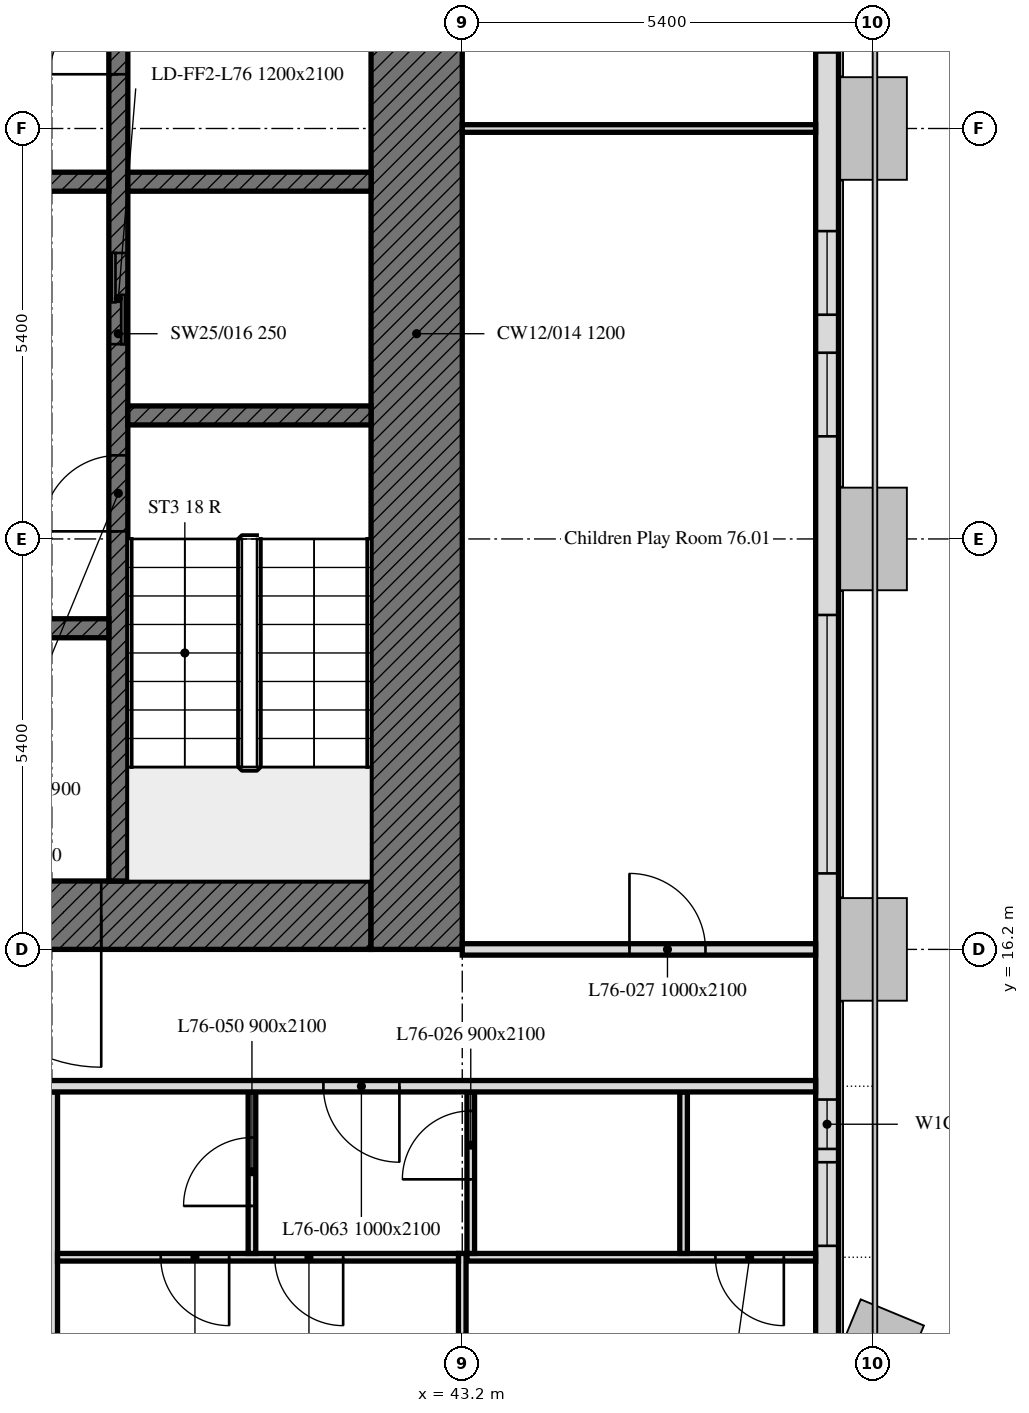
"""IFC4 building model, lengths in metres.
Left out: names, types, materials, properties, quantities, classifications, styles, units other than length and angle.
Written with IfcOpenShell. Run it as: python <this file> out.ifc"""

import sys

from ifc_helpers import new_model, si_unit, direction, frame, frame_2d, origin, place, context, subcontext, project, spatial, rectangle, extrude, element, fill, save


model = new_model("IFC4")
c1 = context("Model", 3, precision=1e-05, world=origin(), true_north=direction((0.0, 1.0)))
c2 = subcontext(c1, "Body", "Model", "MODEL_VIEW")
j1 = project(units=[si_unit("LENGTHUNIT", "METRE"), si_unit("PLANEANGLEUNIT", "RADIAN")], contexts=[c1])
p1 = place(None, origin())
s1 = spatial("IfcSite", under=j1, at=p1, CompositionType="ELEMENT")
p2 = place(p1, origin())
s2 = spatial("IfcBuilding", under=s1, at=p2, CompositionType="ELEMENT")
p3 = place(p2, frame((0.0, 0.0, 304.9)))
s3 = spatial("IfcBuildingStorey", under=s2, at=p3, CompositionType="ELEMENT", Elevation=304.9)
p4 = place(p3, frame((48.0, 10.986, 0.0), z_axis=(0.0, 0.0, 1.0), x_axis=(0.0, 1.0, 0.0)))
e1 = element("IfcWall", 1, at=p4, inside=s3, PredefinedType="SOLIDWALL", context=c2, shape_type="SweptSolid", body=[
    extrude(rectangle(XDim=32.027, YDim=0.3, at=frame_2d((16.014, 0.0))), origin(), (0.0, 0.0, 1.0), 2.8),
])
p5 = place(p4, frame((1.314, 0.0, 0.9)))
e2 = element("IfcOpeningElement", 2, at=p5, cuts=e1, PredefinedType="OPENING", context=c2, shape_type="SweptSolid", body=[
    extrude(rectangle(XDim=1.1, YDim=1.7, at=frame_2d((0.55, 0.85))), frame((0.0, 0.16, 0.0), z_axis=(0.0, -1.0, 0.0), x_axis=(1.0, 0.0, 0.0)), (0.0, 0.0, 1.0), 0.32),
])
p6 = place(p4, frame((2.589, 0.0, 0.9)))
e3 = element("IfcOpeningElement", 3, at=p6, cuts=e1, PredefinedType="OPENING", context=c2, shape_type="SweptSolid", body=[
    extrude(rectangle(XDim=0.65, YDim=1.7, at=frame_2d((0.325, 0.85))), frame((0.0, 0.16, 0.0), z_axis=(0.0, -1.0, 0.0), x_axis=(1.0, 0.0, 0.0)), (0.0, 0.0, 1.0), 0.32),
])
p7 = place(p4, frame((6.214, 0.0, 0.9)))
e4 = element("IfcOpeningElement", 4, at=p7, cuts=e1, PredefinedType="OPENING", context=c2, shape_type="SweptSolid", body=[
    extrude(rectangle(XDim=3.4, YDim=1.7, at=frame_2d((1.7, 0.85))), frame((0.0, 0.16, 0.0), z_axis=(0.0, -1.0, 0.0), x_axis=(1.0, 0.0, 0.0)), (0.0, 0.0, 1.0), 0.32),
])
p8 = place(p4, frame((11.964, 0.0, 0.9)))
e5 = element("IfcOpeningElement", 5, at=p8, cuts=e1, PredefinedType="OPENING", context=c2, shape_type="SweptSolid", body=[
    extrude(rectangle(XDim=1.1, YDim=1.7, at=frame_2d((0.55, 0.85))), frame((0.0, 0.16, 0.0), z_axis=(0.0, -1.0, 0.0), x_axis=(1.0, 0.0, 0.0)), (0.0, 0.0, 1.0), 0.32),
])
p9 = place(p4, frame((13.564, 0.0, 0.9)))
e6 = element("IfcOpeningElement", 6, at=p9, cuts=e1, PredefinedType="OPENING", context=c2, shape_type="SweptSolid", body=[
    extrude(rectangle(XDim=1.1, YDim=1.7, at=frame_2d((0.55, 0.85))), frame((0.0, 0.16, 0.0), z_axis=(0.0, -1.0, 0.0), x_axis=(1.0, 0.0, 0.0)), (0.0, 0.0, 1.0), 0.32),
])
p10 = place(p4, frame((17.014, 0.0, 0.9)))
e7 = element("IfcOpeningElement", 7, at=p10, cuts=e1, PredefinedType="OPENING", context=c2, shape_type="SweptSolid", body=[
    extrude(rectangle(XDim=3.4, YDim=1.7, at=frame_2d((1.7, 0.85))), frame((0.0, 0.16, 0.0), z_axis=(0.0, -1.0, 0.0), x_axis=(1.0, 0.0, 0.0)), (0.0, 0.0, 1.0), 0.32),
])
p11 = place(p4, frame((23.389, 0.0, 0.9)))
e8 = element("IfcOpeningElement", 8, at=p11, cuts=e1, PredefinedType="OPENING", context=c2, shape_type="SweptSolid", body=[
    extrude(rectangle(XDim=0.65, YDim=1.7, at=frame_2d((0.325, 0.85))), frame((0.0, 0.16, 0.0), z_axis=(0.0, -1.0, 0.0), x_axis=(1.0, 0.0, 0.0)), (0.0, 0.0, 1.0), 0.32),
])
p12 = place(p4, frame((24.364, 0.0, 0.9)))
e9 = element("IfcOpeningElement", 9, at=p12, cuts=e1, PredefinedType="OPENING", context=c2, shape_type="SweptSolid", body=[
    extrude(rectangle(XDim=1.1, YDim=1.7, at=frame_2d((0.55, 0.85))), frame((0.0, 0.16, 0.0), z_axis=(0.0, -1.0, 0.0), x_axis=(1.0, 0.0, 0.0)), (0.0, 0.0, 1.0), 0.32),
])
p13 = place(p4, frame((28.164, 0.0, 0.9)))
e10 = element("IfcOpeningElement", 10, at=p13, cuts=e1, PredefinedType="OPENING", context=c2, shape_type="SweptSolid", body=[
    extrude(rectangle(XDim=1.1, YDim=1.7, at=frame_2d((0.55, 0.85))), frame((0.0, 0.16, 0.0), z_axis=(0.0, -1.0, 0.0), x_axis=(1.0, 0.0, 0.0)), (0.0, 0.0, 1.0), 0.32),
])
p14 = place(p4, frame((29.764, 0.0, 0.9)))
e11 = element("IfcOpeningElement", 11, at=p14, cuts=e1, PredefinedType="OPENING", context=c2, shape_type="SweptSolid", body=[
    extrude(rectangle(XDim=1.1, YDim=1.7, at=frame_2d((0.55, 0.85))), frame((0.0, 0.16, 0.0), z_axis=(0.0, -1.0, 0.0), x_axis=(1.0, 0.0, 0.0)), (0.0, 0.0, 1.0), 0.32),
])
p15 = place(p3, frame((42.0, 16.65, 0.0), z_axis=(0.0, 0.0, 1.0), x_axis=(-1.0, 0.0, 0.0)))
e12 = element("IfcWall", 12, at=p15, inside=s3, PredefinedType="SOLIDWALL", context=c2, shape_type="SweptSolid", body=[
    extrude(rectangle(XDim=11.1, YDim=0.9, at=frame_2d((5.55, 0.0))), origin(), (0.0, 0.0, 1.0), 2.8),
])
p16 = place(p15, frame((3.55, 0.0, 0.0)))
e13 = element("IfcOpeningElement", 13, at=p16, cuts=e12, PredefinedType="OPENING", context=c2, shape_type="SweptSolid", body=[
    extrude(rectangle(XDim=2.0, YDim=2.4, at=frame_2d((1.0, 1.2))), frame((0.0, 0.45, 0.0), z_axis=(0.0, -1.0, 0.0), x_axis=(1.0, 0.0, 0.0)), (0.0, 0.0, 1.0), 0.9),
])
p17 = place(p3, frame((42.6, 32.4, 0.0), z_axis=(0.0, 0.0, 1.0), x_axis=(0.0, -1.0, 0.0)))
e14 = element("IfcWall", 14, at=p17, inside=s3, PredefinedType="SOLIDWALL", context=c2, shape_type="SweptSolid", body=[
    extrude(rectangle(XDim=16.2, YDim=1.2, at=frame_2d((8.1, 0.0))), origin(), (0.0, 0.0, 1.0), 2.8),
])
p18 = place(p3, frame((38.675, 17.1, 0.0), z_axis=(0.0, 0.0, 1.0), x_axis=(0.0, 1.0, 0.0)))
e15 = element("IfcWall", 15, at=p18, inside=s3, PredefinedType="SOLIDWALL", context=c2, shape_type="SweptSolid", body=[
    extrude(rectangle(XDim=14.4, YDim=0.25, at=frame_2d((7.2, 0.0))), origin(), (0.0, 0.0, 1.0), 2.8),
])
p19 = place(p18, frame((4.6, 0.0, 0.0)))
e16 = element("IfcOpeningElement", 16, at=p19, cuts=e15, PredefinedType="OPENING", context=c2, shape_type="SweptSolid", body=[
    extrude(rectangle(XDim=1.0, YDim=2.1, at=frame_2d((0.5, 1.05))), frame((0.0, 0.125, 0.0), z_axis=(0.0, -1.0, 0.0), x_axis=(1.0, 0.0, 0.0)), (0.0, 0.0, 1.0), 0.25),
])
p20 = place(p18, frame((7.062, 0.0, 0.0)))
e17 = element("IfcOpeningElement", 17, at=p20, cuts=e15, PredefinedType="OPENING", context=c2, shape_type="SweptSolid", body=[
    extrude(rectangle(XDim=1.2, YDim=2.1, at=frame_2d((0.6, 1.05))), frame((0.0, 0.125, 0.0), z_axis=(0.0, -1.0, 0.0), x_axis=(1.0, 0.0, 0.0)), (0.0, 0.0, 1.0), 0.25),
])
p21 = place(p18, frame((10.614, 0.0, 0.0)))
e18 = element("IfcOpeningElement", 18, at=p21, cuts=e15, PredefinedType="OPENING", context=c2, shape_type="SweptSolid", body=[
    extrude(rectangle(XDim=0.9, YDim=2.1, at=frame_2d((0.45, 1.05))), frame((0.0, 0.125, 0.0), z_axis=(0.0, -1.0, 0.0), x_axis=(1.0, 0.0, 0.0)), (0.0, 0.0, 1.0), 0.25),
])
p22 = place(p18, frame((13.226, 0.0, 0.0)))
e19 = element("IfcOpeningElement", 19, at=p22, cuts=e15, PredefinedType="OPENING", context=c2, shape_type="SweptSolid", body=[
    extrude(rectangle(XDim=0.9, YDim=2.1, at=frame_2d((0.45, 1.05))), frame((0.0, 0.125, 0.0), z_axis=(0.0, -1.0, 0.0), x_axis=(1.0, 0.0, 0.0)), (0.0, 0.0, 1.0), 0.25),
])
for number, where, z_axis, x_axis in (
    (20, (38.8, 23.225, 0.0), (0.0, 0.0, 1.0), (1.0, 0.0, 0.0)),
    (21, (38.8, 26.3, 0.0), (0.0, 0.0, 1.0), (1.0, 0.0, 0.0)),
):
    element("IfcWall", number, at=place(p3, frame(where, z_axis=z_axis, x_axis=x_axis)), inside=s3, PredefinedType="SOLIDWALL", context=c2, shape_type="SweptSolid", body=[
        extrude(rectangle(XDim=3.2, YDim=0.25, at=frame_2d((1.6, 0.0))), origin(), (0.0, 0.0, 1.0), 2.8),
    ])
for number, where, z_axis, x_axis in (
    (22, (35.8, 26.3, 0.0), (0.0, 0.0, 1.0), (1.0, 0.0, 0.0)),
    (23, (35.8, 20.425, 0.0), (0.0, 0.0, 1.0), (1.0, 0.0, 0.0)),
):
    element("IfcWall", number, at=place(p3, frame(where, z_axis=z_axis, x_axis=x_axis)), inside=s3, PredefinedType="SOLIDWALL", context=c2, shape_type="SweptSolid", body=[
        extrude(rectangle(XDim=2.75, YDim=0.25, at=frame_2d((1.375, 0.0))), origin(), (0.0, 0.0, 1.0), 2.8),
    ])
p23 = place(p3, frame((43.2, 27.0, 0.0), z_axis=(0.0, 0.0, 1.0), x_axis=(1.0, 0.0, 0.0)))
e24 = element("IfcWall", 24, at=p23, inside=s3, PredefinedType="PARTITIONING", context=c2, shape_type="SweptSolid", body=[
    extrude(rectangle(XDim=4.649, YDim=0.1, at=frame_2d((2.325, 0.0))), origin(), (0.0, 0.0, 1.0), 2.2),
])
p24 = place(p3, frame((37.8, 11.12, 0.0), z_axis=(0.0, 0.0, 1.0), x_axis=(0.0, 1.0, 0.0)))
e25 = element("IfcWall", 25, at=p24, inside=s3, PredefinedType="PARTITIONING", context=c2, shape_type="SweptSolid", body=[
    extrude(rectangle(XDim=3.205, YDim=0.15, at=frame_2d((1.603, 0.0))), origin(), (0.0, 0.0, 1.0), 2.8),
])
p25 = place(p3, frame((43.2, 11.12, 0.0), z_axis=(0.0, 0.0, 1.0), x_axis=(0.0, 1.0, 0.0)))
e26 = element("IfcWall", 26, at=p25, inside=s3, PredefinedType="PARTITIONING", context=c2, shape_type="SweptSolid", body=[
    extrude(rectangle(XDim=1.08, YDim=0.1, at=frame_2d((0.54, 0.0))), origin(), (0.0, 0.0, 1.0), 2.8),
])
p26 = place(p3, frame((43.15, 12.15, 0.0), z_axis=(0.0, 0.0, 1.0), x_axis=(-1.0, 0.0, 0.0)))
e27 = element("IfcWall", 27, at=p26, inside=s3, PredefinedType="PARTITIONING", context=c2, shape_type="SweptSolid", body=[
    extrude(rectangle(XDim=5.275, YDim=0.1, at=frame_2d((2.637, 0.0))), origin(), (0.0, 0.0, 1.0), 2.8),
])
p27 = place(p26, frame((3.017, 0.0, 0.0)))
e28 = element("IfcOpeningElement", 28, at=p27, cuts=e27, PredefinedType="OPENING", context=c2, shape_type="SweptSolid", body=[
    extrude(rectangle(XDim=0.9, YDim=2.1, at=frame_2d((0.45, 1.05))), frame((0.0, 0.05, 0.0), z_axis=(0.0, -1.0, 0.0), x_axis=(1.0, 0.0, 0.0)), (0.0, 0.0, 1.0), 0.1),
])
p28 = place(p26, frame((1.517, 0.0, 0.0)))
e29 = element("IfcOpeningElement", 29, at=p28, cuts=e27, PredefinedType="OPENING", context=c2, shape_type="SweptSolid", body=[
    extrude(rectangle(XDim=0.9, YDim=2.1, at=frame_2d((0.45, 1.05))), frame((0.0, 0.05, 0.0), z_axis=(0.0, -1.0, 0.0), x_axis=(1.0, 0.0, 0.0)), (0.0, 0.0, 1.0), 0.1),
])
p29 = place(p3, frame((47.849, 12.15, 0.0), z_axis=(0.0, 0.0, 1.0), x_axis=(-1.0, 0.0, 0.0)))
e30 = element("IfcWall", 30, at=p29, inside=s3, PredefinedType="PARTITIONING", context=c2, shape_type="SweptSolid", body=[
    extrude(rectangle(XDim=4.587, YDim=0.1, at=frame_2d((2.293, 0.0))), origin(), (0.0, 0.0, 1.0), 2.8),
])
p30 = place(p29, frame((0.418, 0.0, 0.0)))
e31 = element("IfcOpeningElement", 31, at=p30, cuts=e30, PredefinedType="OPENING", context=c2, shape_type="SweptSolid", body=[
    extrude(rectangle(XDim=0.9, YDim=2.1, at=frame_2d((0.45, 1.05))), frame((0.0, 0.05, 0.0), z_axis=(0.0, -1.0, 0.0), x_axis=(1.0, 0.0, 0.0)), (0.0, 0.0, 1.0), 0.1),
])
p31 = place(p3, frame((40.433, 12.2, 0.0), z_axis=(0.0, 0.0, 1.0), x_axis=(0.0, 1.0, 0.0)))
e32 = element("IfcWall", 32, at=p31, inside=s3, PredefinedType="PARTITIONING", context=c2, shape_type="SweptSolid", body=[
    extrude(rectangle(XDim=2.125, YDim=0.1, at=frame_2d((1.062, 0.0))), origin(), (0.0, 0.0, 1.0), 2.8),
])
p32 = place(p31, frame((0.625, 0.0, 0.0)))
e33 = element("IfcOpeningElement", 33, at=p32, cuts=e32, PredefinedType="OPENING", context=c2, shape_type="SweptSolid", body=[
    extrude(rectangle(XDim=0.9, YDim=2.1, at=frame_2d((0.45, 1.05))), frame((0.0, 0.05, 0.0), z_axis=(0.0, -1.0, 0.0), x_axis=(1.0, 0.0, 0.0)), (0.0, 0.0, 1.0), 0.1),
])
p33 = place(p3, frame((43.312, 12.2, 0.0), z_axis=(0.0, 0.0, 1.0), x_axis=(0.0, 1.0, 0.0)))
e34 = element("IfcWall", 34, at=p33, inside=s3, PredefinedType="PARTITIONING", context=c2, shape_type="SweptSolid", body=[
    extrude(rectangle(XDim=2.125, YDim=0.1, at=frame_2d((1.062, 0.0))), origin(), (0.0, 0.0, 1.0), 2.8),
])
p34 = place(p33, frame((0.975, 0.0, 0.0)))
e35 = element("IfcOpeningElement", 35, at=p34, cuts=e34, PredefinedType="OPENING", context=c2, shape_type="SweptSolid", body=[
    extrude(rectangle(XDim=0.9, YDim=2.1, at=frame_2d((0.45, 1.05))), frame((0.0, 0.05, 0.0), z_axis=(0.0, -1.0, 0.0), x_axis=(1.0, 0.0, 0.0)), (0.0, 0.0, 1.0), 0.1),
])
p35 = place(p3, frame((46.112, 12.2, 0.0), z_axis=(0.0, 0.0, 1.0), x_axis=(0.0, 1.0, 0.0)))
e36 = element("IfcWall", 36, at=p35, inside=s3, PredefinedType="PARTITIONING", context=c2, shape_type="SweptSolid", body=[
    extrude(rectangle(XDim=2.125, YDim=0.1, at=frame_2d((1.062, 0.0))), origin(), (0.0, 0.0, 1.0), 2.8),
])
p36 = place(p3, frame((47.849, 14.4, 0.0), z_axis=(0.0, 0.0, 1.0), x_axis=(-1.0, 0.0, 0.0)))
e37 = element("IfcWall", 37, at=p36, inside=s3, PredefinedType="PARTITIONING", context=c2, shape_type="SweptSolid", body=[
    extrude(rectangle(XDim=41.698, YDim=0.15, at=frame_2d((20.849, 0.0))), origin(), (0.0, 0.0, 1.0), 2.8),
])
p37 = place(p36, frame((38.179, 0.0, 0.0)))
e38 = element("IfcOpeningElement", 38, at=p37, cuts=e37, PredefinedType="OPENING", context=c2, shape_type="SweptSolid", body=[
    extrude(rectangle(XDim=1.0, YDim=2.1, at=frame_2d((0.5, 1.05))), frame((0.0, 0.075, 0.0), z_axis=(0.0, -1.0, 0.0), x_axis=(1.0, 0.0, 0.0)), (0.0, 0.0, 1.0), 0.15),
])
p38 = place(p36, frame((27.977, 0.0, 0.0)))
e39 = element("IfcOpeningElement", 39, at=p38, cuts=e37, PredefinedType="OPENING", context=c2, shape_type="SweptSolid", body=[
    extrude(rectangle(XDim=1.0, YDim=2.1, at=frame_2d((0.5, 1.05))), frame((0.0, 0.075, 0.0), z_axis=(0.0, -1.0, 0.0), x_axis=(1.0, 0.0, 0.0)), (0.0, 0.0, 1.0), 0.15),
])
p39 = place(p36, frame((16.399, 0.0, 0.0)))
e40 = element("IfcOpeningElement", 40, at=p39, cuts=e37, PredefinedType="OPENING", context=c2, shape_type="SweptSolid", body=[
    extrude(rectangle(XDim=1.0, YDim=2.1, at=frame_2d((0.5, 1.05))), frame((0.0, 0.075, 0.0), z_axis=(0.0, -1.0, 0.0), x_axis=(1.0, 0.0, 0.0)), (0.0, 0.0, 1.0), 0.15),
])
p40 = place(p36, frame((5.476, 0.0, 0.0)))
e41 = element("IfcOpeningElement", 41, at=p40, cuts=e37, PredefinedType="OPENING", context=c2, shape_type="SweptSolid", body=[
    extrude(rectangle(XDim=1.0, YDim=2.1, at=frame_2d((0.5, 1.05))), frame((0.0, 0.075, 0.0), z_axis=(0.0, -1.0, 0.0), x_axis=(1.0, 0.0, 0.0)), (0.0, 0.0, 1.0), 0.15),
])
p41 = place(p3, frame((43.2, 16.2, 0.0), z_axis=(0.0, 0.0, 1.0), x_axis=(1.0, 0.0, 0.0)))
e42 = element("IfcWall", 42, at=p41, inside=s3, PredefinedType="PARTITIONING", context=c2, shape_type="SweptSolid", body=[
    extrude(rectangle(XDim=4.649, YDim=0.15, at=frame_2d((2.325, 0.0))), origin(), (0.0, 0.0, 1.0), 2.2),
])
p42 = place(p41, frame((2.2, 0.0, 0.0)))
e43 = element("IfcOpeningElement", 43, at=p42, cuts=e42, PredefinedType="OPENING", context=c2, shape_type="SweptSolid", body=[
    extrude(rectangle(XDim=1.0, YDim=2.1, at=frame_2d((0.5, 1.05))), frame((0.0, 0.075, 0.0), z_axis=(0.0, -1.0, 0.0), x_axis=(1.0, 0.0, 0.0)), (0.0, 0.0, 1.0), 0.15),
])
p43 = place(p5, origin())
e44 = element("IfcWindow", 44, at=p43, inside=s3, PartitioningType="SINGLE_PANEL", PredefinedType="WINDOW", context=c2, shape_type="SweptSolid", body=[
    extrude(rectangle(XDim=1.1, YDim=1.7, at=frame_2d((0.55, 0.85))), frame((0.0, 0.03, 0.0), z_axis=(0.0, -1.0, 0.0), x_axis=(1.0, 0.0, 0.0)), (0.0, 0.0, 1.0), 0.06),
])
fill(e2, e44)
p44 = place(p6, origin())
e45 = element("IfcWindow", 45, at=p44, inside=s3, PartitioningType="SINGLE_PANEL", PredefinedType="WINDOW", context=c2, shape_type="SweptSolid", body=[
    extrude(rectangle(XDim=0.65, YDim=1.7, at=frame_2d((0.325, 0.85))), frame((0.0, 0.03, 0.0), z_axis=(0.0, -1.0, 0.0), x_axis=(1.0, 0.0, 0.0)), (0.0, 0.0, 1.0), 0.06),
])
fill(e3, e45)
p45 = place(p7, origin())
e46 = element("IfcWindow", 46, at=p45, inside=s3, PartitioningType="SINGLE_PANEL", PredefinedType="WINDOW", context=c2, shape_type="SweptSolid", body=[
    extrude(rectangle(XDim=3.4, YDim=1.7, at=frame_2d((1.7, 0.85))), frame((0.0, 0.03, 0.0), z_axis=(0.0, -1.0, 0.0), x_axis=(1.0, 0.0, 0.0)), (0.0, 0.0, 1.0), 0.06),
])
fill(e4, e46)
p46 = place(p8, origin())
e47 = element("IfcWindow", 47, at=p46, inside=s3, PartitioningType="SINGLE_PANEL", PredefinedType="WINDOW", context=c2, shape_type="SweptSolid", body=[
    extrude(rectangle(XDim=1.1, YDim=1.7, at=frame_2d((0.55, 0.85))), frame((0.0, 0.03, 0.0), z_axis=(0.0, -1.0, 0.0), x_axis=(1.0, 0.0, 0.0)), (0.0, 0.0, 1.0), 0.06),
])
fill(e5, e47)
p47 = place(p9, origin())
e48 = element("IfcWindow", 48, at=p47, inside=s3, PartitioningType="SINGLE_PANEL", PredefinedType="WINDOW", context=c2, shape_type="SweptSolid", body=[
    extrude(rectangle(XDim=1.1, YDim=1.7, at=frame_2d((0.55, 0.85))), frame((0.0, 0.03, 0.0), z_axis=(0.0, -1.0, 0.0), x_axis=(1.0, 0.0, 0.0)), (0.0, 0.0, 1.0), 0.06),
])
fill(e6, e48)
p48 = place(p16, origin())
e49 = element("IfcDoor", 49, at=p48, inside=s3, OperationType="DOUBLE_DOOR_SINGLE_SWING", PredefinedType="DOOR", context=c2, shape_type="SweptSolid", body=[
    extrude(rectangle(XDim=2.0, YDim=2.4, at=frame_2d((1.0, 1.2))), frame((0.0, 0.025, 0.0), z_axis=(0.0, -1.0, 0.0), x_axis=(1.0, 0.0, 0.0)), (0.0, 0.0, 1.0), 0.05),
])
fill(e13, e49)
p49 = place(p19, origin())
e50 = element("IfcDoor", 50, at=p49, inside=s3, OperationType="SINGLE_SWING_LEFT", PredefinedType="DOOR", context=c2, shape_type="SweptSolid", body=[
    extrude(rectangle(XDim=1.0, YDim=2.1, at=frame_2d((0.5, 1.05))), frame((0.0, 0.025, 0.0), z_axis=(0.0, -1.0, 0.0), x_axis=(1.0, 0.0, 0.0)), (0.0, 0.0, 1.0), 0.05),
])
fill(e16, e50)
p50 = place(p20, origin())
e51 = element("IfcDoor", 51, at=p50, inside=s3, OperationType="DOUBLE_DOOR_SLIDING", PredefinedType="DOOR", context=c2, shape_type="SweptSolid", body=[
    extrude(rectangle(XDim=1.2, YDim=2.1, at=frame_2d((0.6, 1.05))), frame((0.0, 0.025, 0.0), z_axis=(0.0, -1.0, 0.0), x_axis=(1.0, 0.0, 0.0)), (0.0, 0.0, 1.0), 0.05),
])
fill(e17, e51)
p51 = place(p21, origin())
e52 = element("IfcDoor", 52, at=p51, inside=s3, OperationType="SINGLE_SWING_LEFT", PredefinedType="DOOR", context=c2, shape_type="SweptSolid", body=[
    extrude(rectangle(XDim=0.9, YDim=2.1, at=frame_2d((0.45, 1.05))), frame((0.0, 0.025, 0.0), z_axis=(0.0, -1.0, 0.0), x_axis=(1.0, 0.0, 0.0)), (0.0, 0.0, 1.0), 0.05),
])
fill(e18, e52)
p52 = place(p30, origin())
e53 = element("IfcDoor", 53, at=p52, inside=s3, OperationType="SINGLE_SWING_RIGHT", PredefinedType="DOOR", context=c2, shape_type="SweptSolid", body=[
    extrude(rectangle(XDim=0.9, YDim=2.1, at=frame_2d((0.45, 1.05))), frame((0.0, 0.025, 0.0), z_axis=(0.0, -1.0, 0.0), x_axis=(1.0, 0.0, 0.0)), (0.0, 0.0, 1.0), 0.05),
])
fill(e31, e53)
p53 = place(p34, origin())
e54 = element("IfcDoor", 54, at=p53, inside=s3, OperationType="SINGLE_SWING_LEFT", PredefinedType="DOOR", context=c2, shape_type="SweptSolid", body=[
    extrude(rectangle(XDim=0.9, YDim=2.1, at=frame_2d((0.45, 1.05))), frame((0.0, 0.025, 0.0), z_axis=(0.0, -1.0, 0.0), x_axis=(1.0, 0.0, 0.0)), (0.0, 0.0, 1.0), 0.05),
])
fill(e35, e54)
p54 = place(p42, origin())
e55 = element("IfcDoor", 55, at=p54, inside=s3, OperationType="SINGLE_SWING_LEFT", PredefinedType="DOOR", context=c2, shape_type="SweptSolid", body=[
    extrude(rectangle(XDim=1.0, YDim=2.1, at=frame_2d((0.5, 1.05))), frame((0.0, 0.025, 0.0), z_axis=(0.0, -1.0, 0.0), x_axis=(1.0, 0.0, 0.0)), (0.0, 0.0, 1.0), 0.05),
])
fill(e43, e55)
p55 = place(p27, origin())
e56 = element("IfcDoor", 56, at=p55, inside=s3, OperationType="SINGLE_SWING_LEFT", PredefinedType="DOOR", context=c2, shape_type="SweptSolid", body=[
    extrude(rectangle(XDim=0.9, YDim=2.1, at=frame_2d((0.45, 1.05))), frame((0.0, 0.025, 0.0), z_axis=(0.0, -1.0, 0.0), x_axis=(1.0, 0.0, 0.0)), (0.0, 0.0, 1.0), 0.05),
])
fill(e28, e56)
p56 = place(p32, origin())
e57 = element("IfcDoor", 57, at=p56, inside=s3, OperationType="SINGLE_SWING_LEFT", PredefinedType="DOOR", context=c2, shape_type="SweptSolid", body=[
    extrude(rectangle(XDim=0.9, YDim=2.1, at=frame_2d((0.45, 1.05))), frame((0.0, 0.025, 0.0), z_axis=(0.0, -1.0, 0.0), x_axis=(1.0, 0.0, 0.0)), (0.0, 0.0, 1.0), 0.05),
])
fill(e33, e57)
p57 = place(p28, origin())
e58 = element("IfcDoor", 58, at=p57, inside=s3, OperationType="SINGLE_SWING_RIGHT", PredefinedType="DOOR", context=c2, shape_type="SweptSolid", body=[
    extrude(rectangle(XDim=0.9, YDim=2.1, at=frame_2d((0.45, 1.05))), frame((0.0, 0.025, 0.0), z_axis=(0.0, -1.0, 0.0), x_axis=(1.0, 0.0, 0.0)), (0.0, 0.0, 1.0), 0.05),
])
fill(e29, e58)
p58 = place(p40, origin())
e59 = element("IfcDoor", 59, at=p58, inside=s3, OperationType="SINGLE_SWING_LEFT", PredefinedType="DOOR", context=c2, shape_type="SweptSolid", body=[
    extrude(rectangle(XDim=1.0, YDim=2.1, at=frame_2d((0.5, 1.05))), frame((0.0, 0.025, 0.0), z_axis=(0.0, -1.0, 0.0), x_axis=(1.0, 0.0, 0.0)), (0.0, 0.0, 1.0), 0.05),
])
fill(e41, e59)
save(model, sys.argv[1])
